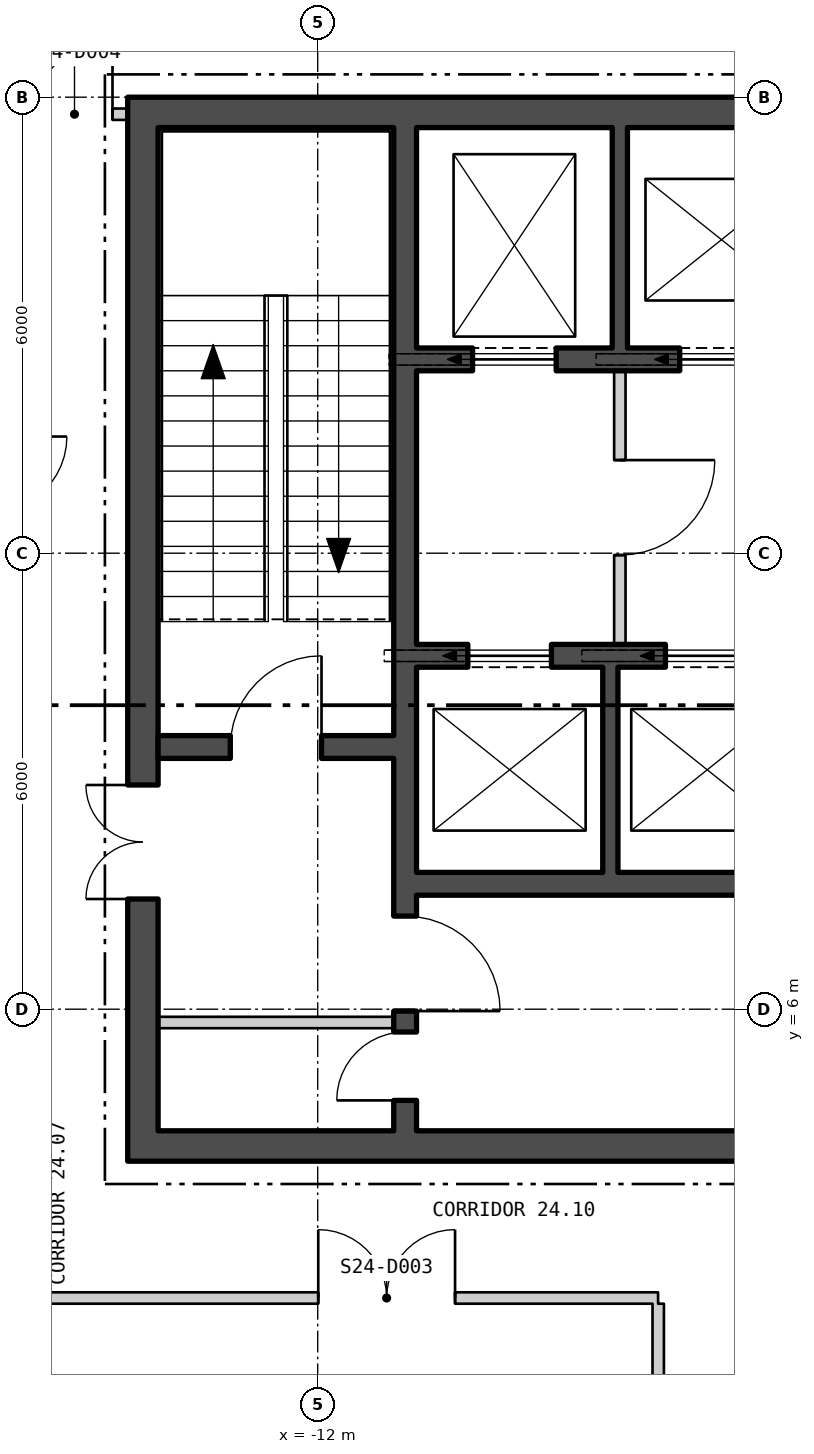
"""IFC4 building model, lengths in metres.
Left out: names, types, materials, properties, quantities, classifications, styles, units other than length and angle.
Written with IfcOpenShell. Run it as: python <this file> out.ifc"""

import sys

from ifc_helpers import new_model, si_unit, direction, frame, frame_2d, origin, place, context, subcontext, project, spatial, polyline, rectangle, outline, extrude, element, fill, save


model = new_model("IFC4")
c1 = context("Model", 3, precision=1e-05, world=origin(), true_north=direction((0.0, 1.0)))
c2 = subcontext(c1, "Body", "Model", "MODEL_VIEW")
j1 = project(units=[si_unit("LENGTHUNIT", "METRE"), si_unit("PLANEANGLEUNIT", "RADIAN")], contexts=[c1])
p1 = place(None, origin())
s1 = spatial("IfcSite", under=j1, at=p1, CompositionType="ELEMENT")
p2 = place(p1, origin())
s2 = spatial("IfcBuilding", under=s1, at=p2, CompositionType="ELEMENT")
p3 = place(p2, frame((0.0, 0.0, 312.6)))
s3 = spatial("IfcBuildingStorey", under=s2, at=p3, CompositionType="ELEMENT", Elevation=312.6)
p4 = place(p3, frame((-24.985, 16.303, -0.18), z_axis=(0.0, 0.0, 1.0), x_axis=(0.500000141277, -0.866025322218, 0.0)))
e1 = element("IfcWall", 1, at=p4, inside=s3, PredefinedType="SOLIDWALL", context=c2, shape_type="SweptSolid", body=[
    extrude(outline(polyline([(-0.13, -0.225), (45.86, -0.225), (45.6, 0.225), (0.13, 0.225), (-0.13, -0.225)])), origin(), (0.0, 0.0, 1.0), 3.98),
])
p5 = place(p4, frame((1.424, 0.0, 1.08)))
e2 = element("IfcOpeningElement", 2, at=p5, cuts=e1, PredefinedType="OPENING", context=c2, shape_type="SweptSolid", body=[
    extrude(rectangle(XDim=2.4, YDim=2.3, at=frame_2d((1.2, 1.15))), frame((0.0, 0.235, 0.0), z_axis=(0.0, -1.0, 0.0), x_axis=(1.0, 0.0, 0.0)), (0.0, 0.0, 1.0), 0.47),
])
p6 = place(p4, frame((5.892, 0.0, 1.08)))
e3 = element("IfcOpeningElement", 3, at=p6, cuts=e1, PredefinedType="OPENING", context=c2, shape_type="SweptSolid", body=[
    extrude(rectangle(XDim=2.4, YDim=2.3, at=frame_2d((1.2, 1.15))), frame((0.0, 0.235, 0.0), z_axis=(0.0, -1.0, 0.0), x_axis=(1.0, 0.0, 0.0)), (0.0, 0.0, 1.0), 0.47),
])
p7 = place(p4, frame((10.399, 0.0, 1.08)))
e4 = element("IfcOpeningElement", 4, at=p7, cuts=e1, PredefinedType="OPENING", context=c2, shape_type="SweptSolid", body=[
    extrude(rectangle(XDim=2.4, YDim=2.3, at=frame_2d((1.2, 1.15))), frame((0.0, 0.235, 0.0), z_axis=(0.0, -1.0, 0.0), x_axis=(1.0, 0.0, 0.0)), (0.0, 0.0, 1.0), 0.47),
])
p8 = place(p4, frame((14.905, 0.0, 1.08)))
e5 = element("IfcOpeningElement", 5, at=p8, cuts=e1, PredefinedType="OPENING", context=c2, shape_type="SweptSolid", body=[
    extrude(rectangle(XDim=2.4, YDim=2.3, at=frame_2d((1.2, 1.15))), frame((0.0, 0.235, 0.0), z_axis=(0.0, -1.0, 0.0), x_axis=(1.0, 0.0, 0.0)), (0.0, 0.0, 1.0), 0.47),
])
p9 = place(p4, frame((19.412, 0.0, 1.08)))
e6 = element("IfcOpeningElement", 6, at=p9, cuts=e1, PredefinedType="OPENING", context=c2, shape_type="SweptSolid", body=[
    extrude(rectangle(XDim=2.4, YDim=2.3, at=frame_2d((1.2, 1.15))), frame((0.0, 0.235, 0.0), z_axis=(0.0, -1.0, 0.0), x_axis=(1.0, 0.0, 0.0)), (0.0, 0.0, 1.0), 0.47),
])
p10 = place(p4, frame((23.918, 0.0, 1.08)))
e7 = element("IfcOpeningElement", 7, at=p10, cuts=e1, PredefinedType="OPENING", context=c2, shape_type="SweptSolid", body=[
    extrude(rectangle(XDim=2.4, YDim=2.3, at=frame_2d((1.2, 1.15))), frame((0.0, 0.235, 0.0), z_axis=(0.0, -1.0, 0.0), x_axis=(1.0, 0.0, 0.0)), (0.0, 0.0, 1.0), 0.47),
])
p11 = place(p4, frame((28.425, 0.0, 1.08)))
e8 = element("IfcOpeningElement", 8, at=p11, cuts=e1, PredefinedType="OPENING", context=c2, shape_type="SweptSolid", body=[
    extrude(rectangle(XDim=2.4, YDim=2.3, at=frame_2d((1.2, 1.15))), frame((0.0, 0.235, 0.0), z_axis=(0.0, -1.0, 0.0), x_axis=(1.0, 0.0, 0.0)), (0.0, 0.0, 1.0), 0.47),
])
p12 = place(p4, frame((37.438, 0.0, 1.08)))
e9 = element("IfcOpeningElement", 9, at=p12, cuts=e1, PredefinedType="OPENING", context=c2, shape_type="SweptSolid", body=[
    extrude(rectangle(XDim=2.4, YDim=2.3, at=frame_2d((1.2, 1.15))), frame((0.0, 0.235, 0.0), z_axis=(0.0, -1.0, 0.0), x_axis=(1.0, 0.0, 0.0)), (0.0, 0.0, 1.0), 0.47),
])
p13 = place(p4, frame((41.907, 0.0, 1.08)))
e10 = element("IfcOpeningElement", 10, at=p13, cuts=e1, PredefinedType="OPENING", context=c2, shape_type="SweptSolid", body=[
    extrude(rectangle(XDim=2.4, YDim=2.3, at=frame_2d((1.2, 1.15))), frame((0.0, 0.235, 0.0), z_axis=(0.0, -1.0, 0.0), x_axis=(1.0, 0.0, 0.0)), (0.0, 0.0, 1.0), 0.47),
])
p14 = place(p3, frame((-14.5, 4.2, 0.0), z_axis=(0.0, 0.0, 1.0), x_axis=(1.0, 0.0, 0.0)))
e11 = element("IfcWall", 11, at=p14, inside=s3, PredefinedType="SHEAR", context=c2, shape_type="SweptSolid", body=[
    extrude(rectangle(XDim=29.0, YDim=0.4, at=frame_2d((14.5, 0.0))), origin(), (0.0, 0.0, 1.0), 4.0),
])
p15 = place(p14, frame((9.0, 0.0, 0.0)))
e12 = element("IfcOpeningElement", 12, at=p15, cuts=e11, PredefinedType="OPENING", context=c2, shape_type="SweptSolid", body=[
    extrude(rectangle(XDim=1.8, YDim=2.4, at=frame_2d((0.9, 1.2))), frame((0.0, 0.21, 0.0), z_axis=(0.0, -1.0, 0.0), x_axis=(1.0, 0.0, 0.0)), (0.0, 0.0, 1.0), 0.42),
])
p16 = place(p14, frame((19.0, 0.0, 0.0)))
e13 = element("IfcOpeningElement", 13, at=p16, cuts=e11, PredefinedType="OPENING", context=c2, shape_type="SweptSolid", body=[
    extrude(rectangle(XDim=1.8, YDim=2.4, at=frame_2d((0.9, 1.2))), frame((0.0, 0.21, 0.0), z_axis=(0.0, -1.0, 0.0), x_axis=(1.0, 0.0, 0.0)), (0.0, 0.0, 1.0), 0.42),
])
p17 = place(p3, frame((-14.5, 17.8, 0.0), z_axis=(0.0, 0.0, 1.0), x_axis=(1.0, 0.0, 0.0)))
e14 = element("IfcWall", 14, at=p17, inside=s3, PredefinedType="SHEAR", context=c2, shape_type="SweptSolid", body=[
    extrude(rectangle(XDim=29.0, YDim=0.4, at=frame_2d((14.5, 0.0))), origin(), (0.0, 0.0, 1.0), 4.0),
])
p18 = place(p3, frame((-14.3, 4.4, 0.0), z_axis=(0.0, 0.0, 1.0), x_axis=(0.0, 1.0, 0.0)))
e15 = element("IfcWall", 15, at=p18, inside=s3, PredefinedType="SHEAR", context=c2, shape_type="SweptSolid", body=[
    extrude(rectangle(XDim=13.2, YDim=0.4, at=frame_2d((6.6, 0.0))), origin(), (0.0, 0.0, 1.0), 4.0),
])
p19 = place(p18, frame((3.05, 0.0, 0.0)))
e16 = element("IfcOpeningElement", 16, at=p19, cuts=e15, PredefinedType="OPENING", context=c2, shape_type="SweptSolid", body=[
    extrude(rectangle(XDim=1.5, YDim=2.1, at=frame_2d((0.75, 1.05))), frame((0.0, 0.21, 0.0), z_axis=(0.0, -1.0, 0.0), x_axis=(1.0, 0.0, 0.0)), (0.0, 0.0, 1.0), 0.42),
])
p20 = place(p3, frame((-10.85, 4.4, 0.0), z_axis=(0.0, 0.0, 1.0), x_axis=(0.0, 1.0, 0.0)))
e17 = element("IfcWall", 17, at=p20, inside=s3, PredefinedType="SHEAR", context=c2, shape_type="SweptSolid", body=[
    extrude(rectangle(XDim=13.2, YDim=0.3, at=frame_2d((6.6, 0.0))), origin(), (0.0, 0.0, 1.0), 4.0),
])
p21 = place(p20, frame((1.575, 0.0, 0.0)))
e18 = element("IfcOpeningElement", 18, at=p21, cuts=e17, PredefinedType="OPENING", context=c2, shape_type="SweptSolid", body=[
    extrude(rectangle(XDim=1.25, YDim=2.1, at=frame_2d((0.625, 1.05))), frame((0.0, 0.16, 0.0), z_axis=(0.0, -1.0, 0.0), x_axis=(1.0, 0.0, 0.0)), (0.0, 0.0, 1.0), 0.32),
])
p22 = place(p20, frame((0.4, 0.0, 0.0)))
e19 = element("IfcOpeningElement", 19, at=p22, cuts=e17, PredefinedType="OPENING", context=c2, shape_type="SweptSolid", body=[
    extrude(rectangle(XDim=0.9, YDim=2.1, at=frame_2d((0.45, 1.05))), frame((0.0, 0.16, 0.0), z_axis=(0.0, -1.0, 0.0), x_axis=(1.0, 0.0, 0.0)), (0.0, 0.0, 1.0), 0.32),
])
p23 = place(p3, frame((-14.1, 9.45, 0.0), z_axis=(0.0, 0.0, 1.0), x_axis=(1.0, 0.0, 0.0)))
e20 = element("IfcWall", 20, at=p23, inside=s3, PredefinedType="SHEAR", context=c2, shape_type="SweptSolid", body=[
    extrude(rectangle(XDim=3.1, YDim=0.3, at=frame_2d((1.55, 0.0))), origin(), (0.0, 0.0, 1.0), 4.0),
])
p24 = place(p23, frame((0.95, 0.0, 0.0)))
e21 = element("IfcOpeningElement", 21, at=p24, cuts=e20, PredefinedType="OPENING", context=c2, shape_type="SweptSolid", body=[
    extrude(rectangle(XDim=1.2, YDim=2.1, at=frame_2d((0.6, 1.05))), frame((0.0, 0.16, 0.0), z_axis=(0.0, -1.0, 0.0), x_axis=(1.0, 0.0, 0.0)), (0.0, 0.0, 1.0), 0.32),
])
p25 = place(p3, frame((-10.7, 14.55, 0.0), z_axis=(0.0, 0.0, 1.0), x_axis=(1.0, 0.0, 0.0)))
e22 = element("IfcWall", 22, at=p25, inside=s3, PredefinedType="SHEAR", context=c2, shape_type="SweptSolid", body=[
    extrude(rectangle(XDim=21.4, YDim=0.3, at=frame_2d((10.7, 0.0))), origin(), (0.0, 0.0, 1.0), 4.0),
])
p26 = place(p25, frame((0.738, 0.0, 0.0)))
e23 = element("IfcOpeningElement", 23, at=p26, cuts=e22, PredefinedType="OPENING", context=c2, shape_type="SweptSolid", body=[
    extrude(rectangle(XDim=1.1, YDim=2.1, at=frame_2d((0.55, 1.05))), frame((0.0, 0.16, 0.0), z_axis=(0.0, -1.0, 0.0), x_axis=(1.0, 0.0, 0.0)), (0.0, 0.0, 1.0), 0.32),
])
p27 = place(p25, frame((3.462, 0.0, 0.0)))
e24 = element("IfcOpeningElement", 24, at=p27, cuts=e22, PredefinedType="OPENING", context=c2, shape_type="SweptSolid", body=[
    extrude(rectangle(XDim=1.1, YDim=2.1, at=frame_2d((0.55, 1.05))), frame((0.0, 0.16, 0.0), z_axis=(0.0, -1.0, 0.0), x_axis=(1.0, 0.0, 0.0)), (0.0, 0.0, 1.0), 0.32),
])
p28 = place(p25, frame((6.138, 0.0, 0.0)))
e25 = element("IfcOpeningElement", 25, at=p28, cuts=e22, PredefinedType="OPENING", context=c2, shape_type="SweptSolid", body=[
    extrude(rectangle(XDim=1.1, YDim=2.1, at=frame_2d((0.55, 1.05))), frame((0.0, 0.16, 0.0), z_axis=(0.0, -1.0, 0.0), x_axis=(1.0, 0.0, 0.0)), (0.0, 0.0, 1.0), 0.32),
])
p29 = place(p25, frame((8.812, 0.0, 0.0)))
e26 = element("IfcOpeningElement", 26, at=p29, cuts=e22, PredefinedType="OPENING", context=c2, shape_type="SweptSolid", body=[
    extrude(rectangle(XDim=1.1, YDim=2.1, at=frame_2d((0.55, 1.05))), frame((0.0, 0.16, 0.0), z_axis=(0.0, -1.0, 0.0), x_axis=(1.0, 0.0, 0.0)), (0.0, 0.0, 1.0), 0.32),
])
p30 = place(p25, frame((19.562, 0.0, 0.0)))
e27 = element("IfcOpeningElement", 27, at=p30, cuts=e22, PredefinedType="OPENING", context=c2, shape_type="SweptSolid", body=[
    extrude(rectangle(XDim=1.1, YDim=2.1, at=frame_2d((0.55, 1.05))), frame((0.0, 0.16, 0.0), z_axis=(0.0, -1.0, 0.0), x_axis=(1.0, 0.0, 0.0)), (0.0, 0.0, 1.0), 0.32),
])
p31 = place(p25, frame((14.213, 0.0, 0.0)))
e28 = element("IfcOpeningElement", 28, at=p31, cuts=e22, PredefinedType="OPENING", context=c2, shape_type="SweptSolid", body=[
    extrude(rectangle(XDim=1.0, YDim=2.1, at=frame_2d((0.5, 1.05))), frame((0.0, 0.16, 0.0), z_axis=(0.0, -1.0, 0.0), x_axis=(1.0, 0.0, 0.0)), (0.0, 0.0, 1.0), 0.32),
])
p32 = place(p3, frame((-10.7, 10.65, 0.0), z_axis=(0.0, 0.0, 1.0), x_axis=(1.0, 0.0, 0.0)))
e29 = element("IfcWall", 29, at=p32, inside=s3, PredefinedType="SHEAR", context=c2, shape_type="SweptSolid", body=[
    extrude(rectangle(XDim=10.3, YDim=0.3, at=frame_2d((5.15, 0.0))), origin(), (0.0, 0.0, 1.0), 4.0),
])
p33 = place(p32, frame((0.675, 0.0, 0.0)))
e30 = element("IfcOpeningElement", 30, at=p33, cuts=e29, PredefinedType="OPENING", context=c2, shape_type="SweptSolid", body=[
    extrude(rectangle(XDim=1.1, YDim=2.1, at=frame_2d((0.55, 1.05))), frame((0.0, 0.16, 0.0), z_axis=(0.0, -1.0, 0.0), x_axis=(1.0, 0.0, 0.0)), (0.0, 0.0, 1.0), 0.32),
])
p34 = place(p32, frame((3.275, 0.0, 0.0)))
e31 = element("IfcOpeningElement", 31, at=p34, cuts=e29, PredefinedType="OPENING", context=c2, shape_type="SweptSolid", body=[
    extrude(rectangle(XDim=1.1, YDim=2.1, at=frame_2d((0.55, 1.05))), frame((0.0, 0.16, 0.0), z_axis=(0.0, -1.0, 0.0), x_axis=(1.0, 0.0, 0.0)), (0.0, 0.0, 1.0), 0.32),
])
p35 = place(p32, frame((5.825, 0.0, 0.0)))
e32 = element("IfcOpeningElement", 32, at=p35, cuts=e29, PredefinedType="OPENING", context=c2, shape_type="SweptSolid", body=[
    extrude(rectangle(XDim=1.1, YDim=2.1, at=frame_2d((0.55, 1.05))), frame((0.0, 0.16, 0.0), z_axis=(0.0, -1.0, 0.0), x_axis=(1.0, 0.0, 0.0)), (0.0, 0.0, 1.0), 0.32),
])
p36 = place(p32, frame((8.425, 0.0, 0.0)))
e33 = element("IfcOpeningElement", 33, at=p36, cuts=e29, PredefinedType="OPENING", context=c2, shape_type="SweptSolid", body=[
    extrude(rectangle(XDim=1.0, YDim=2.1, at=frame_2d((0.5, 1.05))), frame((0.0, 0.16, 0.0), z_axis=(0.0, -1.0, 0.0), x_axis=(1.0, 0.0, 0.0)), (0.0, 0.0, 1.0), 0.32),
])
p37 = place(p3, frame((-10.7, 7.65, 0.0), z_axis=(0.0, 0.0, 1.0), x_axis=(1.0, 0.0, 0.0)))
e34 = element("IfcWall", 34, at=p37, inside=s3, PredefinedType="SHEAR", context=c2, shape_type="SweptSolid", body=[
    extrude(rectangle(XDim=10.3, YDim=0.3, at=frame_2d((5.15, 0.0))), origin(), (0.0, 0.0, 1.0), 4.0),
])
p38 = place(p3, frame((-8.025, 14.7, 0.0), z_axis=(0.0, 0.0, 1.0), x_axis=(0.0, 1.0, 0.0)))
e35 = element("IfcWall", 35, at=p38, inside=s3, PredefinedType="SHEAR", context=c2, shape_type="SweptSolid", body=[
    extrude(rectangle(XDim=2.9, YDim=0.2, at=frame_2d((1.45, 0.0))), origin(), (0.0, 0.0, 1.0), 4.0),
])
p39 = place(p3, frame((-8.15, 7.8, 0.0), z_axis=(0.0, 0.0, 1.0), x_axis=(0.0, 1.0, 0.0)))
e36 = element("IfcWall", 36, at=p39, inside=s3, PredefinedType="SHEAR", context=c2, shape_type="SweptSolid", body=[
    extrude(rectangle(XDim=2.7, YDim=0.2, at=frame_2d((1.35, 0.0))), origin(), (0.0, 0.0, 1.0), 4.0),
])
p40 = place(p3, frame((-8.025, 10.8, 0.0), z_axis=(0.0, 0.0, 1.0), x_axis=(0.0, 1.0, 0.0)))
e37 = element("IfcWall", 37, at=p40, inside=s3, PredefinedType="PARTITIONING", context=c2, shape_type="SweptSolid", body=[
    extrude(rectangle(XDim=3.6, YDim=0.15, at=frame_2d((1.8, 0.0))), origin(), (0.0, 0.0, 1.0), 4.0),
])
p41 = place(p40, frame((1.175, 0.0, 0.0)))
e38 = element("IfcOpeningElement", 38, at=p41, cuts=e37, PredefinedType="OPENING", context=c2, shape_type="SweptSolid", body=[
    extrude(rectangle(XDim=1.25, YDim=2.1, at=frame_2d((0.625, 1.05))), frame((0.0, 0.085, 0.0), z_axis=(0.0, -1.0, 0.0), x_axis=(1.0, 0.0, 0.0)), (0.0, 0.0, 1.0), 0.17),
])
p42 = place(p3, frame((-14.1, 5.825, 0.0), z_axis=(0.0, 0.0, 1.0), x_axis=(1.0, 0.0, 0.0)))
e39 = element("IfcWall", 39, at=p42, inside=s3, PredefinedType="PARTITIONING", context=c2, shape_type="SweptSolid", body=[
    extrude(rectangle(XDim=3.1, YDim=0.15, at=frame_2d((1.55, 0.0))), origin(), (0.0, 0.0, 1.0), 4.0),
])
p43 = place(p3, frame((-16.225, 2.2, 0.0), z_axis=(0.0, 0.0, 1.0), x_axis=(1.0, 0.0, 0.0)))
e40 = element("IfcWall", 40, at=p43, inside=s3, PredefinedType="PARTITIONING", context=c2, shape_type="SweptSolid", body=[
    extrude(rectangle(XDim=8.703, YDim=0.15, at=frame_2d((4.351, 0.0))), origin(), (0.0, 0.0, 1.0), 4.0),
])
p44 = place(p43, frame((4.232, 0.0, 0.0)))
e41 = element("IfcOpeningElement", 41, at=p44, cuts=e40, PredefinedType="OPENING", context=c2, shape_type="SweptSolid", body=[
    extrude(rectangle(XDim=1.8, YDim=2.1, at=frame_2d((0.9, 1.05))), frame((0.0, 0.085, 0.0), z_axis=(0.0, -1.0, 0.0), x_axis=(1.0, 0.0, 0.0)), (0.0, 0.0, 1.0), 0.17),
])
p45 = place(p3, frame((-16.225, 17.776, 0.0), z_axis=(0.0, 0.0, 1.0), x_axis=(1.0, 0.0, 0.0)))
e42 = element("IfcWall", 42, at=p45, inside=s3, PredefinedType="PARTITIONING", context=c2, shape_type="SweptSolid", body=[
    extrude(rectangle(XDim=1.725, YDim=0.15, at=frame_2d((0.863, 0.0))), origin(), (0.0, 0.0, 1.0), 4.0),
])
p46 = place(p45, frame((0.525, 0.0, 0.0)))
e43 = element("IfcOpeningElement", 43, at=p46, cuts=e42, PredefinedType="OPENING", context=c2, shape_type="SweptSolid", body=[
    extrude(rectangle(XDim=1.0, YDim=2.1, at=frame_2d((0.5, 1.05))), frame((0.0, 0.085, 0.0), z_axis=(0.0, -1.0, 0.0), x_axis=(1.0, 0.0, 0.0)), (0.0, 0.0, 1.0), 0.17),
])
p47 = place(p3, frame((-7.52, 0.875, 0.0), z_axis=(0.0, 0.0, 1.0), x_axis=(0.0, 1.0, 0.0)))
e44 = element("IfcWall", 44, at=p47, inside=s3, PredefinedType="PARTITIONING", context=c2, shape_type="SweptSolid", body=[
    extrude(rectangle(XDim=1.25, YDim=0.15, at=frame_2d((0.625, 0.0))), origin(), (0.0, 0.0, 1.0), 4.0),
])
p48 = place(p26, origin())
e45 = element("IfcDoor", 45, at=p48, inside=s3, OperationType="SLIDING_TO_LEFT", PredefinedType="DOOR", context=c2, shape_type="SweptSolid", body=[
    extrude(rectangle(XDim=1.1, YDim=2.1, at=frame_2d((0.55, 1.05))), frame((0.0, 0.025, 0.0), z_axis=(0.0, -1.0, 0.0), x_axis=(1.0, 0.0, 0.0)), (0.0, 0.0, 1.0), 0.05),
])
fill(e23, e45)
p49 = place(p27, origin())
e46 = element("IfcDoor", 46, at=p49, inside=s3, OperationType="SLIDING_TO_LEFT", PredefinedType="DOOR", context=c2, shape_type="SweptSolid", body=[
    extrude(rectangle(XDim=1.1, YDim=2.1, at=frame_2d((0.55, 1.05))), frame((0.0, 0.025, 0.0), z_axis=(0.0, -1.0, 0.0), x_axis=(1.0, 0.0, 0.0)), (0.0, 0.0, 1.0), 0.05),
])
fill(e24, e46)
p50 = place(p33, origin())
e47 = element("IfcDoor", 47, at=p50, inside=s3, OperationType="SLIDING_TO_LEFT", PredefinedType="DOOR", context=c2, shape_type="SweptSolid", body=[
    extrude(rectangle(XDim=1.1, YDim=2.1, at=frame_2d((0.55, 1.05))), frame((0.0, 0.025, 0.0), z_axis=(0.0, -1.0, 0.0), x_axis=(1.0, 0.0, 0.0)), (0.0, 0.0, 1.0), 0.05),
])
fill(e30, e47)
p51 = place(p34, origin())
e48 = element("IfcDoor", 48, at=p51, inside=s3, OperationType="SLIDING_TO_LEFT", PredefinedType="DOOR", context=c2, shape_type="SweptSolid", body=[
    extrude(rectangle(XDim=1.1, YDim=2.1, at=frame_2d((0.55, 1.05))), frame((0.0, 0.025, 0.0), z_axis=(0.0, -1.0, 0.0), x_axis=(1.0, 0.0, 0.0)), (0.0, 0.0, 1.0), 0.05),
])
fill(e31, e48)
p52 = place(p41, origin())
e49 = element("IfcDoor", 49, at=p52, inside=s3, OperationType="SINGLE_SWING_RIGHT", PredefinedType="DOOR", context=c2, shape_type="SweptSolid", body=[
    extrude(rectangle(XDim=1.25, YDim=2.1, at=frame_2d((0.625, 1.05))), frame((0.0, 0.025, 0.0), z_axis=(0.0, -1.0, 0.0), x_axis=(1.0, 0.0, 0.0)), (0.0, 0.0, 1.0), 0.05),
])
fill(e38, e49)
p53 = place(p24, origin())
e50 = element("IfcDoor", 50, at=p53, inside=s3, OperationType="SINGLE_SWING_LEFT", PredefinedType="DOOR", context=c2, shape_type="SweptSolid", body=[
    extrude(rectangle(XDim=1.2, YDim=2.1, at=frame_2d((0.6, 1.05))), frame((0.0, 0.025, 0.0), z_axis=(0.0, -1.0, 0.0), x_axis=(1.0, 0.0, 0.0)), (0.0, 0.0, 1.0), 0.05),
])
fill(e21, e50)
p54 = place(p21, origin())
e51 = element("IfcDoor", 51, at=p54, inside=s3, OperationType="SINGLE_SWING_LEFT", PredefinedType="DOOR", context=c2, shape_type="SweptSolid", body=[
    extrude(rectangle(XDim=1.25, YDim=2.1, at=frame_2d((0.625, 1.05))), frame((0.0, 0.025, 0.0), z_axis=(0.0, -1.0, 0.0), x_axis=(1.0, 0.0, 0.0)), (0.0, 0.0, 1.0), 0.05),
])
fill(e18, e51)
p55 = place(p19, origin())
e52 = element("IfcDoor", 52, at=p55, inside=s3, OperationType="DOUBLE_DOOR_SINGLE_SWING", PredefinedType="DOOR", context=c2, shape_type="SweptSolid", body=[
    extrude(rectangle(XDim=1.5, YDim=2.1, at=frame_2d((0.75, 1.05))), frame((0.0, 0.025, 0.0), z_axis=(0.0, -1.0, 0.0), x_axis=(1.0, 0.0, 0.0)), (0.0, 0.0, 1.0), 0.05),
])
fill(e16, e52)
p56 = place(p22, origin())
e53 = element("IfcDoor", 53, at=p56, inside=s3, OperationType="SINGLE_SWING_RIGHT", PredefinedType="DOOR", context=c2, shape_type="SweptSolid", body=[
    extrude(rectangle(XDim=0.9, YDim=2.1, at=frame_2d((0.45, 1.05))), frame((0.0, 0.025, 0.0), z_axis=(0.0, -1.0, 0.0), x_axis=(1.0, 0.0, 0.0)), (0.0, 0.0, 1.0), 0.05),
])
fill(e19, e53)
p57 = place(p44, origin())
e54 = element("IfcDoor", 54, at=p57, inside=s3, OperationType="DOUBLE_DOOR_SINGLE_SWING", PredefinedType="DOOR", context=c2, shape_type="SweptSolid", body=[
    extrude(rectangle(XDim=1.8, YDim=2.1, at=frame_2d((0.9, 1.05))), frame((0.0, 0.025, 0.0), z_axis=(0.0, -1.0, 0.0), x_axis=(1.0, 0.0, 0.0)), (0.0, 0.0, 1.0), 0.05),
])
fill(e41, e54)
p58 = place(p46, origin())
e55 = element("IfcDoor", 55, at=p58, inside=s3, OperationType="SINGLE_SWING_LEFT", PredefinedType="DOOR", context=c2, shape_type="SweptSolid", body=[
    extrude(rectangle(XDim=1.0, YDim=2.1, at=frame_2d((0.5, 1.05))), frame((0.0, 0.025, 0.0), z_axis=(0.0, -1.0, 0.0), x_axis=(1.0, 0.0, 0.0)), (0.0, 0.0, 1.0), 0.05),
])
fill(e43, e55)
save(model, sys.argv[1])
